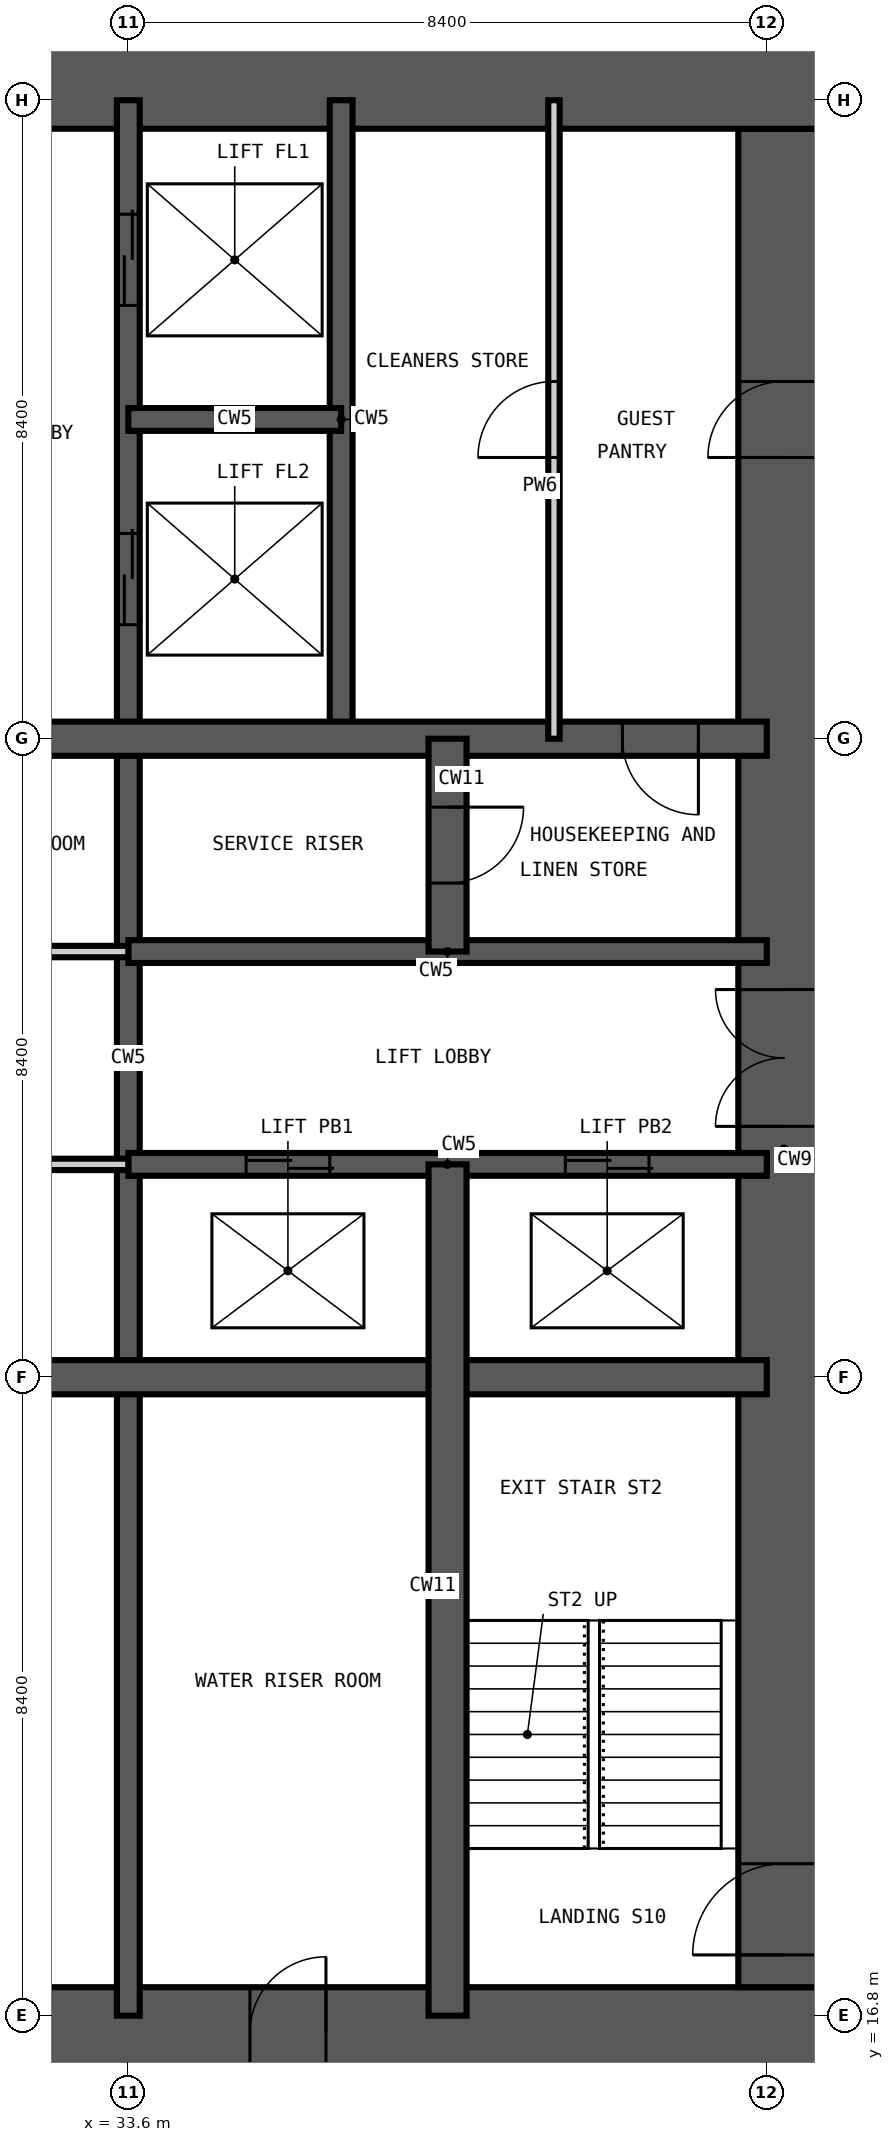
"""IFC4 building model, lengths in metres.
Left out: names, types, materials, properties, quantities, classifications, styles, units other than length and angle.
Written with IfcOpenShell. Run it as: python <this file> out.ifc"""

import sys

from ifc_helpers import new_model, si_unit, direction, frame, frame_2d, origin, place, context, subcontext, project, spatial, rectangle, extrude, element, fill, save


model = new_model("IFC4")
c1 = context("Model", 3, precision=1e-05, world=origin(), true_north=direction((0.0, 1.0)))
c2 = subcontext(c1, "Body", "Model", "MODEL_VIEW")
j1 = project(units=[si_unit("LENGTHUNIT", "METRE"), si_unit("PLANEANGLEUNIT", "RADIAN")], contexts=[c1])
p1 = place(None, origin())
s1 = spatial("IfcSite", under=j1, at=p1, CompositionType="ELEMENT")
p2 = place(p1, origin())
s2 = spatial("IfcBuilding", under=s1, at=p2, CompositionType="ELEMENT")
p3 = place(p2, frame((0.0, 0.0, 100.8)))
s3 = spatial("IfcBuildingStorey", under=s2, at=p3, CompositionType="ELEMENT", Elevation=100.8)
p4 = place(p3, frame((15.975, 16.575, -0.35), z_axis=(0.0, 0.0, 1.0), x_axis=(1.0, 0.0, 0.0)))
e1 = element("IfcWall", 1, at=p4, inside=s3, PredefinedType="SHEAR", context=c2, shape_type="SweptSolid", body=[
    extrude(rectangle(XDim=26.85, YDim=1.2, at=frame_2d((13.425, 0.0))), origin(), (0.0, 0.0, 1.0), 3.6),
])
p5 = place(p4, frame((12.925, 0.0, 0.35)))
e2 = element("IfcOpeningElement", 2, at=p5, cuts=e1, PredefinedType="OPENING", context=c2, shape_type="SweptSolid", body=[
    extrude(rectangle(XDim=1.0, YDim=2.1, at=frame_2d((0.5, 1.05))), frame((0.0, 0.61, 0.0), z_axis=(0.0, -1.0, 0.0), x_axis=(1.0, 0.0, 0.0)), (0.0, 0.0, 1.0), 1.22),
])
p6 = place(p4, frame((19.225, 0.0, 0.35)))
e3 = element("IfcOpeningElement", 3, at=p6, cuts=e1, PredefinedType="OPENING", context=c2, shape_type="SweptSolid", body=[
    extrude(rectangle(XDim=1.0, YDim=2.1, at=frame_2d((0.5, 1.05))), frame((0.0, 0.61, 0.0), z_axis=(0.0, -1.0, 0.0), x_axis=(1.0, 0.0, 0.0)), (0.0, 0.0, 1.0), 1.22),
])
p7 = place(p3, frame((42.225, 17.175, -0.35), z_axis=(0.0, 0.0, 1.0), x_axis=(0.0, 1.0, 0.0)))
e4 = element("IfcWall", 4, at=p7, inside=s3, PredefinedType="SHEAR", context=c2, shape_type="SweptSolid", body=[
    extrude(rectangle(XDim=24.45, YDim=1.2, at=frame_2d((12.225, 0.0))), origin(), (0.0, 0.0, 1.0), 3.6),
])
p8 = place(p7, frame((0.425, 0.0, 0.35)))
e5 = element("IfcOpeningElement", 5, at=p8, cuts=e4, PredefinedType="OPENING", context=c2, shape_type="SweptSolid", body=[
    extrude(rectangle(XDim=1.2, YDim=2.2, at=frame_2d((0.6, 1.1))), frame((0.0, 0.61, 0.0), z_axis=(0.0, -1.0, 0.0), x_axis=(1.0, 0.0, 0.0)), (0.0, 0.0, 1.0), 1.22),
])
p9 = place(p7, frame((11.325, 0.0, 0.35)))
e6 = element("IfcOpeningElement", 6, at=p9, cuts=e4, PredefinedType="OPENING", context=c2, shape_type="SweptSolid", body=[
    extrude(rectangle(XDim=1.8, YDim=2.2, at=frame_2d((0.9, 1.1))), frame((0.0, 0.61, 0.0), z_axis=(0.0, -1.0, 0.0), x_axis=(1.0, 0.0, 0.0)), (0.0, 0.0, 1.0), 1.22),
])
p10 = place(p7, frame((20.125, 0.0, 0.35)))
e7 = element("IfcOpeningElement", 7, at=p10, cuts=e4, PredefinedType="OPENING", context=c2, shape_type="SweptSolid", body=[
    extrude(rectangle(XDim=1.0, YDim=2.1, at=frame_2d((0.5, 1.05))), frame((0.0, 0.61, 0.0), z_axis=(0.0, -1.0, 0.0), x_axis=(1.0, 0.0, 0.0)), (0.0, 0.0, 1.0), 1.22),
])
p11 = place(p3, frame((42.825, 42.225, -0.35), z_axis=(0.0, 0.0, 1.0), x_axis=(-1.0, 0.0, 0.0)))
e8 = element("IfcWall", 8, at=p11, inside=s3, PredefinedType="SHEAR", context=c2, shape_type="SweptSolid", body=[
    extrude(rectangle(XDim=26.85, YDim=1.2, at=frame_2d((13.425, 0.0))), origin(), (0.0, 0.0, 1.0), 3.6),
])
p12 = place(p11, frame((21.325, 0.0, 0.35)))
e9 = element("IfcOpeningElement", 9, at=p12, cuts=e8, PredefinedType="OPENING", context=c2, shape_type="SweptSolid", body=[
    extrude(rectangle(XDim=1.0, YDim=2.1, at=frame_2d((0.5, 1.05))), frame((0.0, 0.61, 0.0), z_axis=(0.0, -1.0, 0.0), x_axis=(1.0, 0.0, 0.0)), (0.0, 0.0, 1.0), 1.22),
])
p13 = place(p11, frame((10.725, 0.0, 0.35)))
e10 = element("IfcOpeningElement", 10, at=p13, cuts=e8, PredefinedType="OPENING", context=c2, shape_type="SweptSolid", body=[
    extrude(rectangle(XDim=1.2, YDim=2.2, at=frame_2d((0.6, 1.1))), frame((0.0, 0.61, 0.0), z_axis=(0.0, -1.0, 0.0), x_axis=(1.0, 0.0, 0.0)), (0.0, 0.0, 1.0), 1.22),
])
p14 = place(p3, frame((33.6, 16.8, -0.35), z_axis=(0.0, 0.0, 1.0), x_axis=(0.0, 1.0, 0.0)))
e11 = element("IfcWall", 11, at=p14, inside=s3, PredefinedType="SHEAR", context=c2, shape_type="SweptSolid", body=[
    extrude(rectangle(XDim=25.2, YDim=0.3, at=frame_2d((12.6, 0.0))), origin(), (0.0, 0.0, 1.0), 3.6),
])
p15 = place(p14, frame((22.5, 0.0, 0.35)))
e12 = element("IfcOpeningElement", 12, at=p15, cuts=e11, PredefinedType="OPENING", context=c2, shape_type="SweptSolid", body=[
    extrude(rectangle(XDim=1.2, YDim=2.2, at=frame_2d((0.6, 1.1))), frame((0.0, 0.16, 0.0), z_axis=(0.0, -1.0, 0.0), x_axis=(1.0, 0.0, 0.0)), (0.0, 0.0, 1.0), 0.32),
])
p16 = place(p14, frame((18.3, 0.0, 0.35)))
e13 = element("IfcOpeningElement", 13, at=p16, cuts=e11, PredefinedType="OPENING", context=c2, shape_type="SweptSolid", body=[
    extrude(rectangle(XDim=1.2, YDim=2.2, at=frame_2d((0.6, 1.1))), frame((0.0, 0.16, 0.0), z_axis=(0.0, -1.0, 0.0), x_axis=(1.0, 0.0, 0.0)), (0.0, 0.0, 1.0), 0.32),
])
p17 = place(p3, frame((36.4, 33.6, -0.35), z_axis=(0.0, 0.0, 1.0), x_axis=(0.0, 1.0, 0.0)))
e14 = element("IfcWall", 14, at=p17, inside=s3, PredefinedType="SHEAR", context=c2, shape_type="SweptSolid", body=[
    extrude(rectangle(XDim=8.4, YDim=0.3, at=frame_2d((4.2, 0.0))), origin(), (0.0, 0.0, 1.0), 3.6),
])
p18 = place(p3, frame((33.6, 28.0, -0.35), z_axis=(0.0, 0.0, 1.0), x_axis=(1.0, 0.0, 0.0)))
e15 = element("IfcWall", 15, at=p18, inside=s3, PredefinedType="SHEAR", context=c2, shape_type="SweptSolid", body=[
    extrude(rectangle(XDim=8.4, YDim=0.3, at=frame_2d((4.2, 0.0))), origin(), (0.0, 0.0, 1.0), 3.6),
])
p19 = place(p18, frame((1.55, 0.0, 0.35)))
e16 = element("IfcOpeningElement", 16, at=p19, cuts=e15, PredefinedType="OPENING", context=c2, shape_type="SweptSolid", body=[
    extrude(rectangle(XDim=1.1, YDim=2.2, at=frame_2d((0.55, 1.1))), frame((0.0, 0.16, 0.0), z_axis=(0.0, -1.0, 0.0), x_axis=(1.0, 0.0, 0.0)), (0.0, 0.0, 1.0), 0.32),
])
p20 = place(p18, frame((5.75, 0.0, 0.35)))
e17 = element("IfcOpeningElement", 17, at=p20, cuts=e15, PredefinedType="OPENING", context=c2, shape_type="SweptSolid", body=[
    extrude(rectangle(XDim=1.1, YDim=2.2, at=frame_2d((0.55, 1.1))), frame((0.0, 0.16, 0.0), z_axis=(0.0, -1.0, 0.0), x_axis=(1.0, 0.0, 0.0)), (0.0, 0.0, 1.0), 0.32),
])
p21 = place(p3, frame((33.6, 30.8, -0.35), z_axis=(0.0, 0.0, 1.0), x_axis=(1.0, 0.0, 0.0)))
e18 = element("IfcWall", 18, at=p21, inside=s3, PredefinedType="SHEAR", context=c2, shape_type="SweptSolid", body=[
    extrude(rectangle(XDim=8.4, YDim=0.3, at=frame_2d((4.2, 0.0))), origin(), (0.0, 0.0, 1.0), 3.6),
])
p22 = place(p3, frame((33.6, 37.8, -0.35), z_axis=(0.0, 0.0, 1.0), x_axis=(1.0, 0.0, 0.0)))
e19 = element("IfcWall", 19, at=p22, inside=s3, PredefinedType="SHEAR", context=c2, shape_type="SweptSolid", body=[
    extrude(rectangle(XDim=2.8, YDim=0.3, at=frame_2d((1.4, 0.0))), origin(), (0.0, 0.0, 1.0), 3.6),
])
p23 = place(p3, frame((16.8, 25.2, -0.35), z_axis=(0.0, 0.0, 1.0), x_axis=(1.0, 0.0, 0.0)))
e20 = element("IfcWall", 20, at=p23, inside=s3, PredefinedType="SHEAR", context=c2, shape_type="SweptSolid", body=[
    extrude(rectangle(XDim=25.2, YDim=0.45, at=frame_2d((12.6, 0.0))), origin(), (0.0, 0.0, 1.0), 3.6),
])
p24 = place(p3, frame((16.8, 33.6, -0.35), z_axis=(0.0, 0.0, 1.0), x_axis=(1.0, 0.0, 0.0)))
e21 = element("IfcWall", 21, at=p24, inside=s3, PredefinedType="SHEAR", context=c2, shape_type="SweptSolid", body=[
    extrude(rectangle(XDim=25.2, YDim=0.45, at=frame_2d((12.6, 0.0))), origin(), (0.0, 0.0, 1.0), 3.6),
])
p25 = place(p24, frame((23.3, 0.0, 0.35)))
e22 = element("IfcOpeningElement", 22, at=p25, cuts=e21, PredefinedType="OPENING", context=c2, shape_type="SweptSolid", body=[
    extrude(rectangle(XDim=1.0, YDim=2.1, at=frame_2d((0.5, 1.05))), frame((0.0, 0.235, 0.0), z_axis=(0.0, -1.0, 0.0), x_axis=(1.0, 0.0, 0.0)), (0.0, 0.0, 1.0), 0.47),
])
p26 = place(p3, frame((37.8, 16.8, -0.35), z_axis=(0.0, 0.0, 1.0), x_axis=(0.0, 1.0, 0.0)))
e23 = element("IfcWall", 23, at=p26, inside=s3, PredefinedType="SHEAR", context=c2, shape_type="SweptSolid", body=[
    extrude(rectangle(XDim=11.2, YDim=0.5, at=frame_2d((5.6, 0.0))), origin(), (0.0, 0.0, 1.0), 3.6),
])
p27 = place(p3, frame((37.8, 30.8, -0.35), z_axis=(0.0, 0.0, 1.0), x_axis=(0.0, 1.0, 0.0)))
e24 = element("IfcWall", 24, at=p27, inside=s3, PredefinedType="SHEAR", context=c2, shape_type="SweptSolid", body=[
    extrude(rectangle(XDim=2.8, YDim=0.5, at=frame_2d((1.4, 0.0))), origin(), (0.0, 0.0, 1.0), 3.6),
])
p28 = place(p27, frame((0.9, 0.0, 0.35)))
e25 = element("IfcOpeningElement", 25, at=p28, cuts=e24, PredefinedType="OPENING", context=c2, shape_type="SweptSolid", body=[
    extrude(rectangle(XDim=1.0, YDim=2.1, at=frame_2d((0.5, 1.05))), frame((0.0, 0.26, 0.0), z_axis=(0.0, -1.0, 0.0), x_axis=(1.0, 0.0, 0.0)), (0.0, 0.0, 1.0), 0.52),
])
p29 = place(p3, frame((39.2, 33.6, 0.0), z_axis=(0.0, 0.0, 1.0), x_axis=(0.0, 1.0, 0.0)))
e26 = element("IfcWall", 26, at=p29, inside=s3, PredefinedType="PARTITIONING", context=c2, shape_type="SweptSolid", body=[
    extrude(rectangle(XDim=8.4, YDim=0.15, at=frame_2d((4.2, 0.0))), origin(), (0.0, 0.0, 1.0), 3.25),
])
p30 = place(p29, frame((3.7, 0.0, 0.0)))
e27 = element("IfcOpeningElement", 27, at=p30, cuts=e26, PredefinedType="OPENING", context=c2, shape_type="SweptSolid", body=[
    extrude(rectangle(XDim=1.0, YDim=2.1, at=frame_2d((0.5, 1.05))), frame((0.0, 0.085, 0.0), z_axis=(0.0, -1.0, 0.0), x_axis=(1.0, 0.0, 0.0)), (0.0, 0.0, 1.0), 0.17),
])
p31 = place(p3, frame((25.2, 28.0, 0.0), z_axis=(0.0, 0.0, 1.0), x_axis=(1.0, 0.0, 0.0)))
e28 = element("IfcWall", 28, at=p31, inside=s3, PredefinedType="PARTITIONING", context=c2, shape_type="SweptSolid", body=[
    extrude(rectangle(XDim=8.4, YDim=0.15, at=frame_2d((4.2, 0.0))), origin(), (0.0, 0.0, 1.0), 3.25),
])
p32 = place(p31, frame((3.7, 0.0, 0.0)))
e29 = element("IfcOpeningElement", 29, at=p32, cuts=e28, PredefinedType="OPENING", context=c2, shape_type="SweptSolid", body=[
    extrude(rectangle(XDim=1.0, YDim=2.1, at=frame_2d((0.5, 1.05))), frame((0.0, 0.085, 0.0), z_axis=(0.0, -1.0, 0.0), x_axis=(1.0, 0.0, 0.0)), (0.0, 0.0, 1.0), 0.17),
])
p33 = place(p3, frame((25.2, 30.8, 0.0), z_axis=(0.0, 0.0, 1.0), x_axis=(1.0, 0.0, 0.0)))
e30 = element("IfcWall", 30, at=p33, inside=s3, PredefinedType="PARTITIONING", context=c2, shape_type="SweptSolid", body=[
    extrude(rectangle(XDim=8.4, YDim=0.15, at=frame_2d((4.2, 0.0))), origin(), (0.0, 0.0, 1.0), 3.25),
])
p34 = place(p33, frame((1.6, 0.0, 0.0)))
e31 = element("IfcOpeningElement", 31, at=p34, cuts=e30, PredefinedType="OPENING", context=c2, shape_type="SweptSolid", body=[
    extrude(rectangle(XDim=1.0, YDim=2.1, at=frame_2d((0.5, 1.05))), frame((0.0, 0.085, 0.0), z_axis=(0.0, -1.0, 0.0), x_axis=(1.0, 0.0, 0.0)), (0.0, 0.0, 1.0), 0.17),
])
p35 = place(p33, frame((5.8, 0.0, 0.0)))
e32 = element("IfcOpeningElement", 32, at=p35, cuts=e30, PredefinedType="OPENING", context=c2, shape_type="SweptSolid", body=[
    extrude(rectangle(XDim=1.0, YDim=2.1, at=frame_2d((0.5, 1.05))), frame((0.0, 0.085, 0.0), z_axis=(0.0, -1.0, 0.0), x_axis=(1.0, 0.0, 0.0)), (0.0, 0.0, 1.0), 0.17),
])
p36 = place(p8, origin())
e33 = element("IfcDoor", 33, at=p36, inside=s3, OperationType="SINGLE_SWING_LEFT", PredefinedType="DOOR", context=c2, shape_type="SweptSolid", body=[
    extrude(rectangle(XDim=1.2, YDim=2.2, at=frame_2d((0.6, 1.1))), frame((0.0, 0.025, 0.0), z_axis=(0.0, -1.0, 0.0), x_axis=(1.0, 0.0, 0.0)), (0.0, 0.0, 1.0), 0.05),
])
fill(e5, e33)
p37 = place(p19, origin())
e34 = element("IfcDoor", 34, at=p37, inside=s3, OperationType="DOUBLE_DOOR_SLIDING", PredefinedType="DOOR", context=c2, shape_type="SweptSolid", body=[
    extrude(rectangle(XDim=1.1, YDim=2.2, at=frame_2d((0.55, 1.1))), frame((0.0, 0.025, 0.0), z_axis=(0.0, -1.0, 0.0), x_axis=(1.0, 0.0, 0.0)), (0.0, 0.0, 1.0), 0.05),
])
fill(e16, e34)
p38 = place(p20, origin())
e35 = element("IfcDoor", 35, at=p38, inside=s3, OperationType="DOUBLE_DOOR_SLIDING", PredefinedType="DOOR", context=c2, shape_type="SweptSolid", body=[
    extrude(rectangle(XDim=1.1, YDim=2.2, at=frame_2d((0.55, 1.1))), frame((0.0, 0.025, 0.0), z_axis=(0.0, -1.0, 0.0), x_axis=(1.0, 0.0, 0.0)), (0.0, 0.0, 1.0), 0.05),
])
fill(e17, e35)
p39 = place(p15, origin())
e36 = element("IfcDoor", 36, at=p39, inside=s3, OperationType="DOUBLE_DOOR_SLIDING", PredefinedType="DOOR", context=c2, shape_type="SweptSolid", body=[
    extrude(rectangle(XDim=1.2, YDim=2.2, at=frame_2d((0.6, 1.1))), frame((0.0, 0.025, 0.0), z_axis=(0.0, -1.0, 0.0), x_axis=(1.0, 0.0, 0.0)), (0.0, 0.0, 1.0), 0.05),
])
fill(e12, e36)
p40 = place(p16, origin())
e37 = element("IfcDoor", 37, at=p40, inside=s3, OperationType="DOUBLE_DOOR_SLIDING", PredefinedType="DOOR", context=c2, shape_type="SweptSolid", body=[
    extrude(rectangle(XDim=1.2, YDim=2.2, at=frame_2d((0.6, 1.1))), frame((0.0, 0.025, 0.0), z_axis=(0.0, -1.0, 0.0), x_axis=(1.0, 0.0, 0.0)), (0.0, 0.0, 1.0), 0.05),
])
fill(e13, e37)
p41 = place(p28, frame((1.0, 0.0, 0.0), z_axis=(0.0, 0.0, 1.0), x_axis=(-1.0, 0.0, 0.0)))
e38 = element("IfcDoor", 38, at=p41, inside=s3, OperationType="SINGLE_SWING_LEFT", PredefinedType="DOOR", context=c2, shape_type="SweptSolid", body=[
    extrude(rectangle(XDim=1.0, YDim=2.1, at=frame_2d((0.5, 1.05))), frame((0.0, 0.025, 0.0), z_axis=(0.0, -1.0, 0.0), x_axis=(1.0, 0.0, 0.0)), (0.0, 0.0, 1.0), 0.05),
])
fill(e25, e38)
p42 = place(p25, frame((1.0, 0.0, 0.0), z_axis=(0.0, 0.0, 1.0), x_axis=(-1.0, 0.0, 0.0)))
e39 = element("IfcDoor", 39, at=p42, inside=s3, OperationType="SINGLE_SWING_LEFT", PredefinedType="DOOR", context=c2, shape_type="SweptSolid", body=[
    extrude(rectangle(XDim=1.0, YDim=2.1, at=frame_2d((0.5, 1.05))), frame((0.0, 0.025, 0.0), z_axis=(0.0, -1.0, 0.0), x_axis=(1.0, 0.0, 0.0)), (0.0, 0.0, 1.0), 0.05),
])
fill(e22, e39)
p43 = place(p9, origin())
e40 = element("IfcDoor", 40, at=p43, inside=s3, OperationType="DOUBLE_DOOR_DOUBLE_SWING", PredefinedType="DOOR", context=c2, shape_type="SweptSolid", body=[
    extrude(rectangle(XDim=1.8, YDim=2.2, at=frame_2d((0.9, 1.1))), frame((0.0, 0.025, 0.0), z_axis=(0.0, -1.0, 0.0), x_axis=(1.0, 0.0, 0.0)), (0.0, 0.0, 1.0), 0.05),
])
fill(e6, e40)
p44 = place(p10, origin())
e41 = element("IfcDoor", 41, at=p44, inside=s3, OperationType="SINGLE_SWING_LEFT", PredefinedType="DOOR", context=c2, shape_type="SweptSolid", body=[
    extrude(rectangle(XDim=1.0, YDim=2.1, at=frame_2d((0.5, 1.05))), frame((0.0, 0.025, 0.0), z_axis=(0.0, -1.0, 0.0), x_axis=(1.0, 0.0, 0.0)), (0.0, 0.0, 1.0), 0.05),
])
fill(e7, e41)
p45 = place(p30, origin())
e42 = element("IfcDoor", 42, at=p45, inside=s3, OperationType="SINGLE_SWING_LEFT", PredefinedType="DOOR", context=c2, shape_type="SweptSolid", body=[
    extrude(rectangle(XDim=1.0, YDim=2.1, at=frame_2d((0.5, 1.05))), frame((0.0, 0.025, 0.0), z_axis=(0.0, -1.0, 0.0), x_axis=(1.0, 0.0, 0.0)), (0.0, 0.0, 1.0), 0.05),
])
fill(e27, e42)
p46 = place(p6, origin())
e43 = element("IfcDoor", 43, at=p46, inside=s3, OperationType="SINGLE_SWING_RIGHT", PredefinedType="DOOR", context=c2, shape_type="SweptSolid", body=[
    extrude(rectangle(XDim=1.0, YDim=2.1, at=frame_2d((0.5, 1.05))), frame((0.0, 0.025, 0.0), z_axis=(0.0, -1.0, 0.0), x_axis=(1.0, 0.0, 0.0)), (0.0, 0.0, 1.0), 0.05),
])
fill(e3, e43)
save(model, sys.argv[1])
